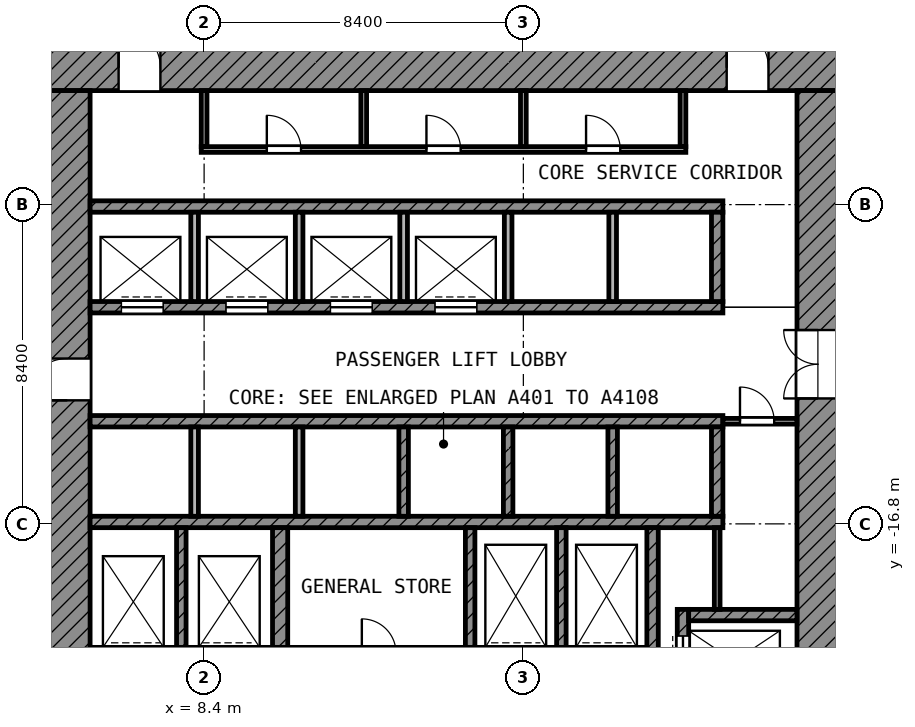
"""IFC4 building model, lengths in metres.
Left out: names, types, materials, properties, quantities, classifications, styles, units other than length and angle.
Written with IfcOpenShell. Run it as: python <this file> out.ifc"""

import sys

from ifc_helpers import new_model, si_unit, direction, frame, frame_2d, origin, place, context, subcontext, project, spatial, rectangle, extrude, element, fill, save


model = new_model("IFC4")
c1 = context("Model", 3, precision=1e-05, world=origin(), true_north=direction((0.0, 1.0)))
c2 = subcontext(c1, "Body", "Model", "MODEL_VIEW")
j1 = project(units=[si_unit("LENGTHUNIT", "METRE"), si_unit("PLANEANGLEUNIT", "RADIAN")], contexts=[c1])
p1 = place(None, origin())
s1 = spatial("IfcSite", under=j1, at=p1, CompositionType="ELEMENT")
p2 = place(p1, origin())
s2 = spatial("IfcBuilding", under=s1, at=p2, CompositionType="ELEMENT")
p3 = place(p2, frame((0.0, 0.0, 81.2)))
s3 = spatial("IfcBuildingStorey", under=s2, at=p3, CompositionType="ELEMENT", Elevation=81.2)
p4 = place(p3, frame((4.2, -4.8, 0.0), z_axis=(0.0, 0.0, 1.0), x_axis=(1.0, 0.0, 0.0)))
e1 = element("IfcWall", 1, at=p4, inside=s3, PredefinedType="SHEAR", context=c2, shape_type="SweptSolid", body=[
    extrude(rectangle(XDim=20.9, YDim=1.2, at=frame_2d((10.45, 0.0))), origin(), (0.0, 0.0, 1.0), 3.9),
])
p5 = place(p4, frame((1.95, 0.0, 0.0)))
e2 = element("IfcOpeningElement", 2, at=p5, cuts=e1, PredefinedType="OPENING", context=c2, shape_type="SweptSolid", body=[
    extrude(rectangle(XDim=1.1, YDim=2.1, at=frame_2d((0.55, 1.05))), frame((0.0, 0.61, 0.0), z_axis=(0.0, -1.0, 0.0), x_axis=(1.0, 0.0, 0.0)), (0.0, 0.0, 1.0), 1.22),
])
p6 = place(p4, frame((17.95, 0.0, 0.0)))
e3 = element("IfcOpeningElement", 3, at=p6, cuts=e1, PredefinedType="OPENING", context=c2, shape_type="SweptSolid", body=[
    extrude(rectangle(XDim=1.1, YDim=2.1, at=frame_2d((0.55, 1.05))), frame((0.0, 0.61, 0.0), z_axis=(0.0, -1.0, 0.0), x_axis=(1.0, 0.0, 0.0)), (0.0, 0.0, 1.0), 1.22),
])
p7 = place(p3, frame((4.8, -25.1, 0.0), z_axis=(0.0, 0.0, 1.0), x_axis=(0.0, 1.0, 0.0)))
e4 = element("IfcWall", 4, at=p7, inside=s3, PredefinedType="SHEAR", context=c2, shape_type="SweptSolid", body=[
    extrude(rectangle(XDim=19.7, YDim=1.2, at=frame_2d((9.85, 0.0))), origin(), (0.0, 0.0, 1.0), 3.9),
])
p8 = place(p7, frame((11.55, 0.0, 0.0)))
e5 = element("IfcOpeningElement", 5, at=p8, cuts=e4, PredefinedType="OPENING", context=c2, shape_type="SweptSolid", body=[
    extrude(rectangle(XDim=1.1, YDim=2.1, at=frame_2d((0.55, 1.05))), frame((0.0, 0.61, 0.0), z_axis=(0.0, -1.0, 0.0), x_axis=(1.0, 0.0, 0.0)), (0.0, 0.0, 1.0), 1.22),
])
p9 = place(p7, frame((2.25, 0.0, 0.0)))
e6 = element("IfcOpeningElement", 6, at=p9, cuts=e4, PredefinedType="OPENING", context=c2, shape_type="SweptSolid", body=[
    extrude(rectangle(XDim=1.1, YDim=2.1, at=frame_2d((0.55, 1.05))), frame((0.0, 0.61, 0.0), z_axis=(0.0, -1.0, 0.0), x_axis=(1.0, 0.0, 0.0)), (0.0, 0.0, 1.0), 1.22),
])
p10 = place(p3, frame((24.55, -24.0, 0.0), z_axis=(0.0, 0.0, 1.0), x_axis=(0.0, 1.0, 0.0)))
e7 = element("IfcWall", 7, at=p10, inside=s3, PredefinedType="SHEAR", context=c2, shape_type="SweptSolid", body=[
    extrude(rectangle(XDim=18.6, YDim=1.1, at=frame_2d((9.3, 0.0))), origin(), (0.0, 0.0, 1.0), 3.9),
])
p11 = place(p10, frame((10.5, 0.0, 0.0)))
e8 = element("IfcOpeningElement", 8, at=p11, cuts=e7, PredefinedType="OPENING", context=c2, shape_type="SweptSolid", body=[
    extrude(rectangle(XDim=1.8, YDim=2.1, at=frame_2d((0.9, 1.05))), frame((0.0, 0.56, 0.0), z_axis=(0.0, -1.0, 0.0), x_axis=(1.0, 0.0, 0.0)), (0.0, 0.0, 1.0), 1.12),
])
p12 = place(p3, frame((5.4, -8.45, 0.0), z_axis=(0.0, 0.0, 1.0), x_axis=(1.0, 0.0, 0.0)))
e9 = element("IfcWall", 9, at=p12, inside=s3, PredefinedType="SHEAR", context=c2, shape_type="SweptSolid", body=[
    extrude(rectangle(XDim=16.65, YDim=0.3, at=frame_2d((8.325, 0.0))), origin(), (0.0, 0.0, 1.0), 3.9),
])
p13 = place(p3, frame((5.4, -11.1, 0.0), z_axis=(0.0, 0.0, 1.0), x_axis=(1.0, 0.0, 0.0)))
e10 = element("IfcWall", 10, at=p13, inside=s3, PredefinedType="SHEAR", context=c2, shape_type="SweptSolid", body=[
    extrude(rectangle(XDim=16.65, YDim=0.3, at=frame_2d((8.325, 0.0))), origin(), (0.0, 0.0, 1.0), 3.9),
])
p14 = place(p13, frame((0.825, 0.0, 0.0)))
e11 = element("IfcOpeningElement", 11, at=p14, cuts=e10, PredefinedType="OPENING", context=c2, shape_type="SweptSolid", body=[
    extrude(rectangle(XDim=1.1, YDim=2.1, at=frame_2d((0.55, 1.05))), frame((0.0, 0.16, 0.0), z_axis=(0.0, -1.0, 0.0), x_axis=(1.0, 0.0, 0.0)), (0.0, 0.0, 1.0), 0.32),
])
p15 = place(p13, frame((3.575, 0.0, 0.0)))
e12 = element("IfcOpeningElement", 12, at=p15, cuts=e10, PredefinedType="OPENING", context=c2, shape_type="SweptSolid", body=[
    extrude(rectangle(XDim=1.1, YDim=2.1, at=frame_2d((0.55, 1.05))), frame((0.0, 0.16, 0.0), z_axis=(0.0, -1.0, 0.0), x_axis=(1.0, 0.0, 0.0)), (0.0, 0.0, 1.0), 0.32),
])
p16 = place(p13, frame((6.325, 0.0, 0.0)))
e13 = element("IfcOpeningElement", 13, at=p16, cuts=e10, PredefinedType="OPENING", context=c2, shape_type="SweptSolid", body=[
    extrude(rectangle(XDim=1.1, YDim=2.1, at=frame_2d((0.55, 1.05))), frame((0.0, 0.16, 0.0), z_axis=(0.0, -1.0, 0.0), x_axis=(1.0, 0.0, 0.0)), (0.0, 0.0, 1.0), 0.32),
])
p17 = place(p13, frame((9.075, 0.0, 0.0)))
e14 = element("IfcOpeningElement", 14, at=p17, cuts=e10, PredefinedType="OPENING", context=c2, shape_type="SweptSolid", body=[
    extrude(rectangle(XDim=1.1, YDim=2.1, at=frame_2d((0.55, 1.05))), frame((0.0, 0.16, 0.0), z_axis=(0.0, -1.0, 0.0), x_axis=(1.0, 0.0, 0.0)), (0.0, 0.0, 1.0), 0.32),
])
for number, where, z_axis, x_axis in (
    (15, (5.4, -14.1, 0.0), (0.0, 0.0, 1.0), (1.0, 0.0, 0.0)),
    (16, (5.4, -16.75, 0.0), (0.0, 0.0, 1.0), (1.0, 0.0, 0.0)),
):
    element("IfcWall", number, at=place(p3, frame(where, z_axis=z_axis, x_axis=x_axis)), inside=s3, PredefinedType="SHEAR", context=c2, shape_type="SweptSolid", body=[
        extrude(rectangle(XDim=16.65, YDim=0.3, at=frame_2d((8.325, 0.0))), origin(), (0.0, 0.0, 1.0), 3.9),
    ])
p18 = place(p3, frame((5.4, -20.2, 0.0), z_axis=(0.0, 0.0, 1.0), x_axis=(1.0, 0.0, 0.0)))
e17 = element("IfcWall", 17, at=p18, inside=s3, PredefinedType="SHEAR", context=c2, shape_type="SweptSolid", body=[
    extrude(rectangle(XDim=14.65, YDim=0.3, at=frame_2d((7.325, 0.0))), origin(), (0.0, 0.0, 1.0), 3.9),
])
p19 = place(p18, frame((10.55, 0.0, 0.0)))
e18 = element("IfcOpeningElement", 18, at=p19, cuts=e17, PredefinedType="OPENING", context=c2, shape_type="SweptSolid", body=[
    extrude(rectangle(XDim=1.3, YDim=2.1, at=frame_2d((0.65, 1.05))), frame((0.0, 0.16, 0.0), z_axis=(0.0, -1.0, 0.0), x_axis=(1.0, 0.0, 0.0)), (0.0, 0.0, 1.0), 0.32),
])
p20 = place(p18, frame((12.95, 0.0, 0.0)))
e19 = element("IfcOpeningElement", 19, at=p20, cuts=e17, PredefinedType="OPENING", context=c2, shape_type="SweptSolid", body=[
    extrude(rectangle(XDim=1.3, YDim=2.1, at=frame_2d((0.65, 1.05))), frame((0.0, 0.16, 0.0), z_axis=(0.0, -1.0, 0.0), x_axis=(1.0, 0.0, 0.0)), (0.0, 0.0, 1.0), 0.32),
])
p21 = place(p18, frame((0.55, 0.0, 0.0)))
e20 = element("IfcOpeningElement", 20, at=p21, cuts=e17, PredefinedType="OPENING", context=c2, shape_type="SweptSolid", body=[
    extrude(rectangle(XDim=1.3, YDim=2.1, at=frame_2d((0.65, 1.05))), frame((0.0, 0.16, 0.0), z_axis=(0.0, -1.0, 0.0), x_axis=(1.0, 0.0, 0.0)), (0.0, 0.0, 1.0), 0.32),
])
p22 = place(p18, frame((2.95, 0.0, 0.0)))
e21 = element("IfcOpeningElement", 21, at=p22, cuts=e17, PredefinedType="OPENING", context=c2, shape_type="SweptSolid", body=[
    extrude(rectangle(XDim=1.3, YDim=2.1, at=frame_2d((0.65, 1.05))), frame((0.0, 0.16, 0.0), z_axis=(0.0, -1.0, 0.0), x_axis=(1.0, 0.0, 0.0)), (0.0, 0.0, 1.0), 0.32),
])
p23 = place(p18, frame((7.15, 0.0, 0.0)))
e22 = element("IfcOpeningElement", 22, at=p23, cuts=e17, PredefinedType="OPENING", context=c2, shape_type="SweptSolid", body=[
    extrude(rectangle(XDim=0.9, YDim=2.1, at=frame_2d((0.45, 1.05))), frame((0.0, 0.16, 0.0), z_axis=(0.0, -1.0, 0.0), x_axis=(1.0, 0.0, 0.0)), (0.0, 0.0, 1.0), 0.32),
])
p24 = place(p3, frame((10.4, -20.05, 0.0), z_axis=(0.0, 0.0, 1.0), x_axis=(0.0, 1.0, 0.0)))
e23 = element("IfcWall", 23, at=p24, inside=s3, PredefinedType="SHEAR", context=c2, shape_type="SweptSolid", body=[
    extrude(rectangle(XDim=3.15, YDim=0.4, at=frame_2d((1.575, 0.0))), origin(), (0.0, 0.0, 1.0), 3.9),
])
p25 = place(p3, frame((20.2, -20.35, 0.0), z_axis=(0.0, 0.0, 1.0), x_axis=(0.0, 1.0, 0.0)))
e24 = element("IfcWall", 24, at=p25, inside=s3, PredefinedType="SHEAR", context=c2, shape_type="SweptSolid", body=[
    extrude(rectangle(XDim=3.45, YDim=0.3, at=frame_2d((1.725, 0.0))), origin(), (0.0, 0.0, 1.0), 3.9),
])
p26 = place(p3, frame((21.9, -10.95, 0.0), z_axis=(0.0, 0.0, 1.0), x_axis=(0.0, 1.0, 0.0)))
e25 = element("IfcWall", 25, at=p26, inside=s3, PredefinedType="SHEAR", context=c2, shape_type="SweptSolid", body=[
    extrude(rectangle(XDim=2.35, YDim=0.3, at=frame_2d((1.175, 0.0))), origin(), (0.0, 0.0, 1.0), 3.9),
])
p27 = place(p3, frame((21.9, -16.6, 0.0), z_axis=(0.0, 0.0, 1.0), x_axis=(0.0, 1.0, 0.0)))
e26 = element("IfcWall", 26, at=p27, inside=s3, PredefinedType="SHEAR", context=c2, shape_type="SweptSolid", body=[
    extrude(rectangle(XDim=2.35, YDim=0.3, at=frame_2d((1.175, 0.0))), origin(), (0.0, 0.0, 1.0), 3.9),
])
p28 = place(p3, frame((21.15, -19.2, 0.0), z_axis=(0.0, 0.0, 1.0), x_axis=(1.0, 0.0, 0.0)))
e27 = element("IfcWall", 27, at=p28, inside=s3, PredefinedType="SHEAR", context=c2, shape_type="SweptSolid", body=[
    extrude(rectangle(XDim=2.85, YDim=0.3, at=frame_2d((1.425, 0.0))), origin(), (0.0, 0.0, 1.0), 3.9),
])
p29 = place(p3, frame((21.0, -24.0, 0.0), z_axis=(0.0, 0.0, 1.0), x_axis=(0.0, 1.0, 0.0)))
e28 = element("IfcWall", 28, at=p29, inside=s3, PredefinedType="SHEAR", context=c2, shape_type="SweptSolid", body=[
    extrude(rectangle(XDim=4.95, YDim=0.3, at=frame_2d((2.475, 0.0))), origin(), (0.0, 0.0, 1.0), 3.9),
])
p30 = place(p29, frame((2.95, 0.0, 0.0)))
e29 = element("IfcOpeningElement", 29, at=p30, cuts=e28, PredefinedType="OPENING", context=c2, shape_type="SweptSolid", body=[
    extrude(rectangle(XDim=1.3, YDim=2.1, at=frame_2d((0.65, 1.05))), frame((0.0, 0.16, 0.0), z_axis=(0.0, -1.0, 0.0), x_axis=(1.0, 0.0, 0.0)), (0.0, 0.0, 1.0), 0.32),
])
p31 = place(p29, frame((0.55, 0.0, 0.0)))
e30 = element("IfcOpeningElement", 30, at=p31, cuts=e28, PredefinedType="OPENING", context=c2, shape_type="SweptSolid", body=[
    extrude(rectangle(XDim=1.3, YDim=2.1, at=frame_2d((0.65, 1.05))), frame((0.0, 0.16, 0.0), z_axis=(0.0, -1.0, 0.0), x_axis=(1.0, 0.0, 0.0)), (0.0, 0.0, 1.0), 0.32),
])
for number, where, z_axis, x_axis in (
    (31, (7.8, -20.05, 0.0), (0.0, 0.0, 1.0), (0.0, 1.0, 0.0)),
    (32, (15.4, -20.05, 0.0), (0.0, 0.0, 1.0), (0.0, 1.0, 0.0)),
    (33, (17.8, -20.05, 0.0), (0.0, 0.0, 1.0), (0.0, 1.0, 0.0)),
):
    element("IfcWall", number, at=place(p3, frame(where, z_axis=z_axis, x_axis=x_axis)), inside=s3, PredefinedType="SHEAR", context=c2, shape_type="SweptSolid", body=[
        extrude(rectangle(XDim=3.15, YDim=0.25, at=frame_2d((1.575, 0.0))), origin(), (0.0, 0.0, 1.0), 3.9),
    ])
for number, where, z_axis, x_axis in (
    (34, (8.15, -10.95, 0.0), (0.0, 0.0, 1.0), (0.0, 1.0, 0.0)),
    (35, (10.9, -10.95, 0.0), (0.0, 0.0, 1.0), (0.0, 1.0, 0.0)),
    (36, (13.65, -10.95, 0.0), (0.0, 0.0, 1.0), (0.0, 1.0, 0.0)),
    (37, (16.4, -10.95, 0.0), (0.0, 0.0, 1.0), (0.0, 1.0, 0.0)),
    (38, (19.15, -10.95, 0.0), (0.0, 0.0, 1.0), (0.0, 1.0, 0.0)),
):
    element("IfcWall", number, at=place(p3, frame(where, z_axis=z_axis, x_axis=x_axis)), inside=s3, PredefinedType="PARTITIONING", context=c2, shape_type="SweptSolid", body=[
        extrude(rectangle(XDim=2.35, YDim=0.2, at=frame_2d((1.175, 0.0))), origin(), (0.0, 0.0, 1.0), 3.9),
    ])
for number, where, z_axis, x_axis in (
    (39, (8.15, -16.6, 0.0), (0.0, 0.0, 1.0), (0.0, 1.0, 0.0)),
    (40, (10.9, -16.6, 0.0), (0.0, 0.0, 1.0), (0.0, 1.0, 0.0)),
):
    element("IfcWall", number, at=place(p3, frame(where, z_axis=z_axis, x_axis=x_axis)), inside=s3, PredefinedType="PARTITIONING", context=c2, shape_type="SweptSolid", body=[
        extrude(rectangle(XDim=2.35, YDim=0.2, at=frame_2d((1.175, 0.0))), origin(), (0.0, 0.0, 1.0), 3.9),
    ])
for number, where, z_axis, x_axis in (
    (41, (13.65, -16.6, 0.0), (0.0, 0.0, 1.0), (0.0, 1.0, 0.0)),
    (42, (16.4, -16.6, 0.0), (0.0, 0.0, 1.0), (0.0, 1.0, 0.0)),
    (43, (19.15, -16.6, 0.0), (0.0, 0.0, 1.0), (0.0, 1.0, 0.0)),
):
    element("IfcWall", number, at=place(p3, frame(where, z_axis=z_axis, x_axis=x_axis)), inside=s3, PredefinedType="SHEAR", context=c2, shape_type="SweptSolid", body=[
        extrude(rectangle(XDim=2.35, YDim=0.25, at=frame_2d((1.175, 0.0))), origin(), (0.0, 0.0, 1.0), 3.9),
    ])
p32 = place(p3, frame((21.9, -19.05, 0.0), z_axis=(0.0, 0.0, 1.0), x_axis=(0.0, 1.0, 0.0)))
e44 = element("IfcWall", 44, at=p32, inside=s3, PredefinedType="PARTITIONING", context=c2, shape_type="SweptSolid", body=[
    extrude(rectangle(XDim=2.15, YDim=0.15, at=frame_2d((1.075, 0.0))), origin(), (0.0, 0.0, 1.0), 3.9),
])
p33 = place(p3, frame((22.05, -14.1, 0.0), z_axis=(0.0, 0.0, 1.0), x_axis=(1.0, 0.0, 0.0)))
e45 = element("IfcWall", 45, at=p33, inside=s3, PredefinedType="PARTITIONING", context=c2, shape_type="SweptSolid", body=[
    extrude(rectangle(XDim=1.95, YDim=0.15, at=frame_2d((0.975, 0.0))), origin(), (0.0, 0.0, 1.0), 3.9),
])
p34 = place(p33, frame((0.45, 0.0, 0.0)))
e46 = element("IfcOpeningElement", 46, at=p34, cuts=e45, PredefinedType="OPENING", context=c2, shape_type="SweptSolid", body=[
    extrude(rectangle(XDim=0.9, YDim=2.1, at=frame_2d((0.45, 1.05))), frame((0.0, 0.085, 0.0), z_axis=(0.0, -1.0, 0.0), x_axis=(1.0, 0.0, 0.0)), (0.0, 0.0, 1.0), 0.17),
])
p35 = place(p3, frame((8.325, -6.95, 0.0), z_axis=(0.0, 0.0, 1.0), x_axis=(1.0, 0.0, 0.0)))
e47 = element("IfcWall", 47, at=p35, inside=s3, PredefinedType="PARTITIONING", context=c2, shape_type="SweptSolid", body=[
    extrude(rectangle(XDim=12.75, YDim=0.15, at=frame_2d((6.375, 0.0))), origin(), (0.0, 0.0, 1.0), 3.9),
])
p36 = place(p35, frame((1.725, 0.0, 0.0)))
e48 = element("IfcOpeningElement", 48, at=p36, cuts=e47, PredefinedType="OPENING", context=c2, shape_type="SweptSolid", body=[
    extrude(rectangle(XDim=0.9, YDim=2.1, at=frame_2d((0.45, 1.05))), frame((0.0, 0.085, 0.0), z_axis=(0.0, -1.0, 0.0), x_axis=(1.0, 0.0, 0.0)), (0.0, 0.0, 1.0), 0.17),
])
p37 = place(p35, frame((5.925, 0.0, 0.0)))
e49 = element("IfcOpeningElement", 49, at=p37, cuts=e47, PredefinedType="OPENING", context=c2, shape_type="SweptSolid", body=[
    extrude(rectangle(XDim=0.9, YDim=2.1, at=frame_2d((0.45, 1.05))), frame((0.0, 0.085, 0.0), z_axis=(0.0, -1.0, 0.0), x_axis=(1.0, 0.0, 0.0)), (0.0, 0.0, 1.0), 0.17),
])
p38 = place(p35, frame((10.125, 0.0, 0.0)))
e50 = element("IfcOpeningElement", 50, at=p38, cuts=e47, PredefinedType="OPENING", context=c2, shape_type="SweptSolid", body=[
    extrude(rectangle(XDim=0.9, YDim=2.1, at=frame_2d((0.45, 1.05))), frame((0.0, 0.085, 0.0), z_axis=(0.0, -1.0, 0.0), x_axis=(1.0, 0.0, 0.0)), (0.0, 0.0, 1.0), 0.17),
])
for number, where, z_axis, x_axis in (
    (51, (8.4, -6.875, 0.0), (0.0, 0.0, 1.0), (0.0, 1.0, 0.0)),
    (52, (12.6, -6.875, 0.0), (0.0, 0.0, 1.0), (0.0, 1.0, 0.0)),
    (53, (16.8, -6.875, 0.0), (0.0, 0.0, 1.0), (0.0, 1.0, 0.0)),
    (54, (21.0, -6.875, 0.0), (0.0, 0.0, 1.0), (0.0, 1.0, 0.0)),
):
    element("IfcWall", number, at=place(p3, frame(where, z_axis=z_axis, x_axis=x_axis)), inside=s3, PredefinedType="PARTITIONING", context=c2, shape_type="SweptSolid", body=[
        extrude(rectangle(XDim=1.475, YDim=0.15, at=frame_2d((0.738, 0.0))), origin(), (0.0, 0.0, 1.0), 3.9),
    ])
p39 = place(p14, origin())
e55 = element("IfcDoor", 55, at=p39, inside=s3, OperationType="DOUBLE_DOOR_SLIDING", PredefinedType="DOOR", context=c2, shape_type="SweptSolid", body=[
    extrude(rectangle(XDim=1.1, YDim=2.1, at=frame_2d((0.55, 1.05))), frame((0.0, 0.025, 0.0), z_axis=(0.0, -1.0, 0.0), x_axis=(1.0, 0.0, 0.0)), (0.0, 0.0, 1.0), 0.05),
])
fill(e11, e55)
p40 = place(p15, origin())
e56 = element("IfcDoor", 56, at=p40, inside=s3, OperationType="DOUBLE_DOOR_SLIDING", PredefinedType="DOOR", context=c2, shape_type="SweptSolid", body=[
    extrude(rectangle(XDim=1.1, YDim=2.1, at=frame_2d((0.55, 1.05))), frame((0.0, 0.025, 0.0), z_axis=(0.0, -1.0, 0.0), x_axis=(1.0, 0.0, 0.0)), (0.0, 0.0, 1.0), 0.05),
])
fill(e12, e56)
p41 = place(p16, origin())
e57 = element("IfcDoor", 57, at=p41, inside=s3, OperationType="DOUBLE_DOOR_SLIDING", PredefinedType="DOOR", context=c2, shape_type="SweptSolid", body=[
    extrude(rectangle(XDim=1.1, YDim=2.1, at=frame_2d((0.55, 1.05))), frame((0.0, 0.025, 0.0), z_axis=(0.0, -1.0, 0.0), x_axis=(1.0, 0.0, 0.0)), (0.0, 0.0, 1.0), 0.05),
])
fill(e13, e57)
p42 = place(p17, origin())
e58 = element("IfcDoor", 58, at=p42, inside=s3, OperationType="DOUBLE_DOOR_SLIDING", PredefinedType="DOOR", context=c2, shape_type="SweptSolid", body=[
    extrude(rectangle(XDim=1.1, YDim=2.1, at=frame_2d((0.55, 1.05))), frame((0.0, 0.025, 0.0), z_axis=(0.0, -1.0, 0.0), x_axis=(1.0, 0.0, 0.0)), (0.0, 0.0, 1.0), 0.05),
])
fill(e14, e58)
p43 = place(p30, origin())
e59 = element("IfcDoor", 59, at=p43, inside=s3, OperationType="DOUBLE_DOOR_SLIDING", PredefinedType="DOOR", context=c2, shape_type="SweptSolid", body=[
    extrude(rectangle(XDim=1.3, YDim=2.1, at=frame_2d((0.65, 1.05))), frame((0.0, 0.025, 0.0), z_axis=(0.0, -1.0, 0.0), x_axis=(1.0, 0.0, 0.0)), (0.0, 0.0, 1.0), 0.05),
])
fill(e29, e59)
p44 = place(p8, origin())
e60 = element("IfcDoor", 60, at=p44, inside=s3, OperationType="SINGLE_SWING_LEFT", PredefinedType="DOOR", context=c2, shape_type="SweptSolid", body=[
    extrude(rectangle(XDim=1.1, YDim=2.1, at=frame_2d((0.55, 1.05))), frame((0.0, 0.025, 0.0), z_axis=(0.0, -1.0, 0.0), x_axis=(1.0, 0.0, 0.0)), (0.0, 0.0, 1.0), 0.05),
])
fill(e5, e60)
p45 = place(p5, origin())
e61 = element("IfcDoor", 61, at=p45, inside=s3, OperationType="SINGLE_SWING_LEFT", PredefinedType="DOOR", context=c2, shape_type="SweptSolid", body=[
    extrude(rectangle(XDim=1.1, YDim=2.1, at=frame_2d((0.55, 1.05))), frame((0.0, 0.025, 0.0), z_axis=(0.0, -1.0, 0.0), x_axis=(1.0, 0.0, 0.0)), (0.0, 0.0, 1.0), 0.05),
])
fill(e2, e61)
p46 = place(p6, origin())
e62 = element("IfcDoor", 62, at=p46, inside=s3, OperationType="SINGLE_SWING_LEFT", PredefinedType="DOOR", context=c2, shape_type="SweptSolid", body=[
    extrude(rectangle(XDim=1.1, YDim=2.1, at=frame_2d((0.55, 1.05))), frame((0.0, 0.025, 0.0), z_axis=(0.0, -1.0, 0.0), x_axis=(1.0, 0.0, 0.0)), (0.0, 0.0, 1.0), 0.05),
])
fill(e3, e62)
p47 = place(p11, origin())
e63 = element("IfcDoor", 63, at=p47, inside=s3, OperationType="DOUBLE_DOOR_SINGLE_SWING", PredefinedType="DOOR", context=c2, shape_type="SweptSolid", body=[
    extrude(rectangle(XDim=1.8, YDim=2.1, at=frame_2d((0.9, 1.05))), frame((0.0, 0.025, 0.0), z_axis=(0.0, -1.0, 0.0), x_axis=(1.0, 0.0, 0.0)), (0.0, 0.0, 1.0), 0.05),
])
fill(e8, e63)
p48 = place(p36, origin())
e64 = element("IfcDoor", 64, at=p48, inside=s3, OperationType="SINGLE_SWING_LEFT", PredefinedType="DOOR", context=c2, shape_type="SweptSolid", body=[
    extrude(rectangle(XDim=0.9, YDim=2.1, at=frame_2d((0.45, 1.05))), frame((0.0, 0.025, 0.0), z_axis=(0.0, -1.0, 0.0), x_axis=(1.0, 0.0, 0.0)), (0.0, 0.0, 1.0), 0.05),
])
fill(e48, e64)
p49 = place(p37, origin())
e65 = element("IfcDoor", 65, at=p49, inside=s3, OperationType="SINGLE_SWING_LEFT", PredefinedType="DOOR", context=c2, shape_type="SweptSolid", body=[
    extrude(rectangle(XDim=0.9, YDim=2.1, at=frame_2d((0.45, 1.05))), frame((0.0, 0.025, 0.0), z_axis=(0.0, -1.0, 0.0), x_axis=(1.0, 0.0, 0.0)), (0.0, 0.0, 1.0), 0.05),
])
fill(e49, e65)
p50 = place(p38, origin())
e66 = element("IfcDoor", 66, at=p50, inside=s3, OperationType="SINGLE_SWING_LEFT", PredefinedType="DOOR", context=c2, shape_type="SweptSolid", body=[
    extrude(rectangle(XDim=0.9, YDim=2.1, at=frame_2d((0.45, 1.05))), frame((0.0, 0.025, 0.0), z_axis=(0.0, -1.0, 0.0), x_axis=(1.0, 0.0, 0.0)), (0.0, 0.0, 1.0), 0.05),
])
fill(e50, e66)
p51 = place(p34, origin())
e67 = element("IfcDoor", 67, at=p51, inside=s3, OperationType="SINGLE_SWING_LEFT", PredefinedType="DOOR", context=c2, shape_type="SweptSolid", body=[
    extrude(rectangle(XDim=0.9, YDim=2.1, at=frame_2d((0.45, 1.05))), frame((0.0, 0.025, 0.0), z_axis=(0.0, -1.0, 0.0), x_axis=(1.0, 0.0, 0.0)), (0.0, 0.0, 1.0), 0.05),
])
fill(e46, e67)
save(model, sys.argv[1])
